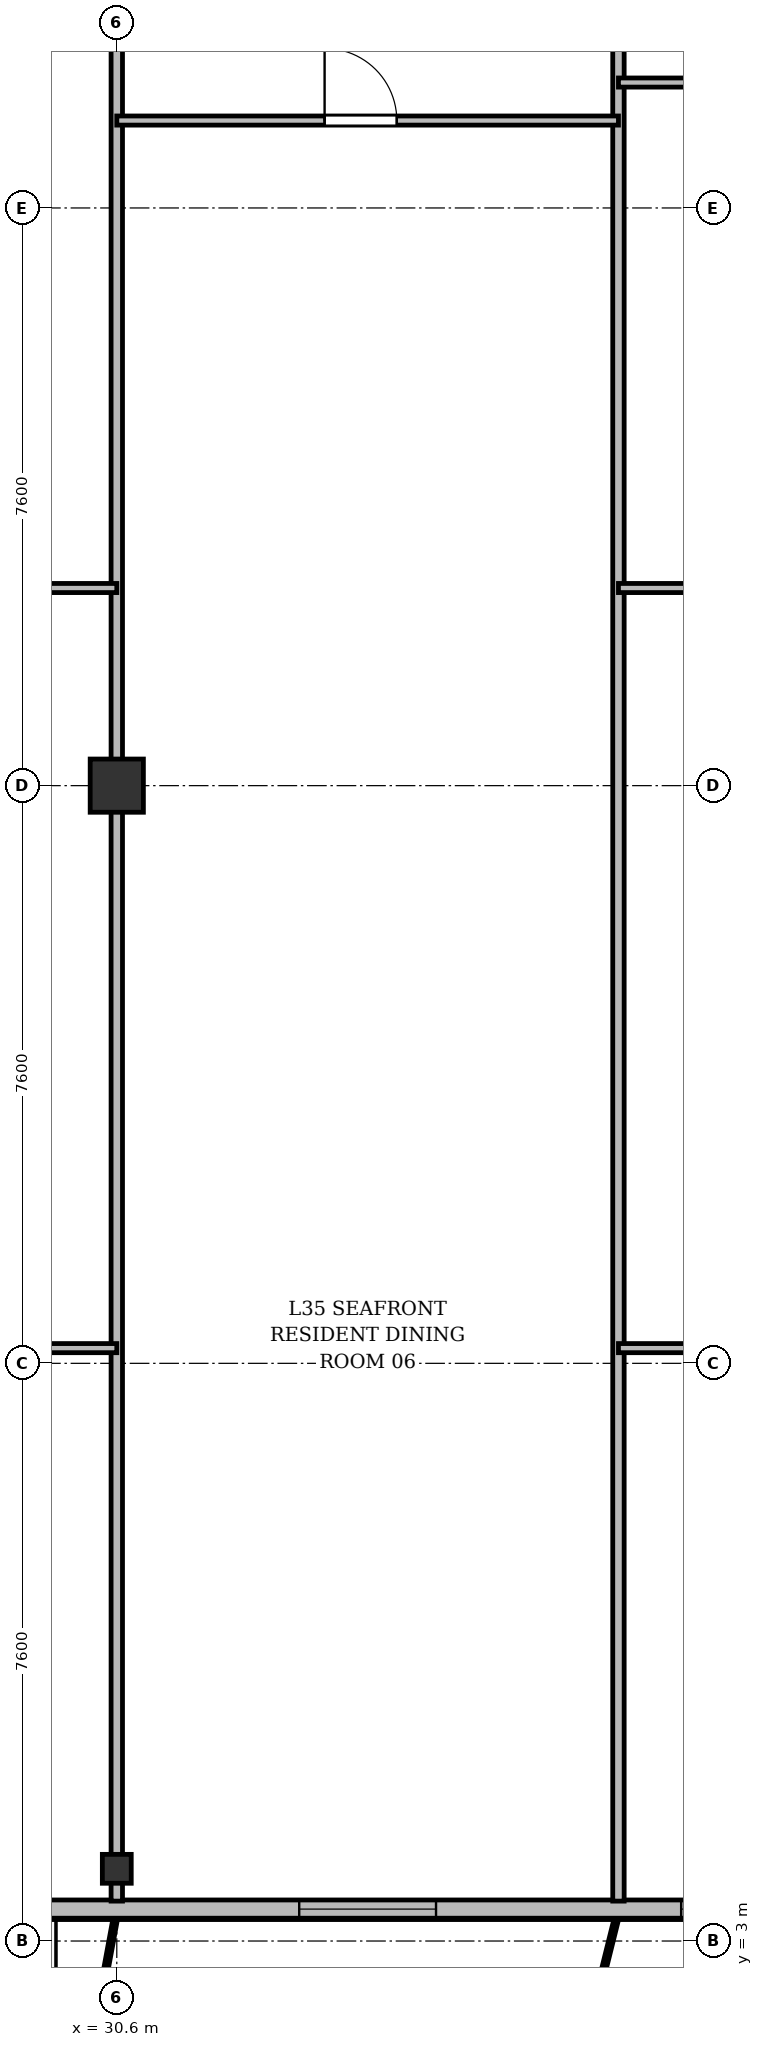
"""IFC4 building model, lengths in metres.
Left out: names, types, materials, properties, quantities, classifications, styles, units other than length and angle.
Written with IfcOpenShell. Run it as: python <this file> out.ifc"""

import sys

from ifc_helpers import new_model, si_unit, direction, frame, frame_2d, origin, origin_2d, place, context, subcontext, project, spatial, rectangle, i_section, extrude, source, transform, mapped, element, fill, save


model = new_model("IFC4")
c1 = context("Model", 3, precision=1e-05, world=origin(), true_north=direction((0.0, 1.0)))
c2 = subcontext(c1, "Body", "Model", "MODEL_VIEW")
j1 = project(units=[si_unit("LENGTHUNIT", "METRE"), si_unit("PLANEANGLEUNIT", "RADIAN")], contexts=[c1])
p1 = place(None, origin())
s1 = spatial("IfcSite", under=j1, at=p1, CompositionType="ELEMENT")
p2 = place(p1, origin())
s2 = spatial("IfcBuilding", under=s1, at=p2, CompositionType="ELEMENT")
p3 = place(p2, frame((0.0, 0.0, 135.7)))
s3 = spatial("IfcBuildingStorey", under=s2, at=p3, CompositionType="ELEMENT", Elevation=135.7)
m1 = source(origin(), c2, "Body", "SweptSolid", [
    extrude(i_section(OverallWidth=0.38, OverallDepth=0.38, WebThickness=0.02, FlangeThickness=0.03, at=origin_2d()), origin(), (0.0, 0.0, 1.0), 3.6),
])
p4 = place(p3, frame((30.6, 3.95, 0.0), z_axis=(0.0, 0.0, 1.0), x_axis=(1.0, 0.0, 0.0)))
e1 = element("IfcColumn", 1, at=p4, inside=s3, PredefinedType="COLUMN", context=c2, shape_type="MappedRepresentation", body=[
    mapped(m1, transform((0.0, 0.0, 0.0), x_axis=(1.0, 0.0, 0.0), y_axis=(0.0, 1.0, 0.0), z_axis=(0.0, 0.0, 1.0), scale=1.0)),
])
m2 = source(origin(), c2, "Body", "SweptSolid", [
    extrude(rectangle(XDim=0.7, YDim=0.7, at=origin_2d()), origin(), (0.0, 0.0, 1.0), 3.6),
])
p5 = place(p3, frame((30.6, 18.2, 0.0), z_axis=(0.0, 0.0, 1.0), x_axis=(1.0, 0.0, 0.0)))
e2 = element("IfcColumn", 2, at=p5, inside=s3, PredefinedType="COLUMN", context=c2, shape_type="MappedRepresentation", body=[
    mapped(m2, transform((0.0, 0.0, 0.0), x_axis=(1.0, 0.0, 0.0), y_axis=(0.0, 1.0, 0.0), z_axis=(0.0, 0.0, 1.0), scale=1.0)),
])
p6 = place(p3, frame((63.6, 3.42, 0.0), z_axis=(0.0, 0.0, 1.0), x_axis=(-1.0, 0.0, 0.0)))
e3 = element("IfcWall", 3, at=p6, inside=s3, PredefinedType="SOLIDWALL", context=c2, shape_type="SweptSolid", body=[
    extrude(rectangle(XDim=52.8, YDim=0.24, at=frame_2d((26.4, 0.0))), origin(), (0.0, 0.0, 1.0), 3.35),
])
p7 = place(p6, frame((0.345, 0.0, 0.9)))
e4 = element("IfcOpeningElement", 4, at=p7, cuts=e3, PredefinedType="OPENING", context=c2, shape_type="SweptSolid", body=[
    extrude(rectangle(XDim=1.8, YDim=1.8, at=frame_2d((0.9, 0.9))), frame((0.0, 0.13, 0.0), z_axis=(0.0, -1.0, 0.0), x_axis=(1.0, 0.0, 0.0)), (0.0, 0.0, 1.0), 0.26),
])
p8 = place(p6, frame((2.9, 0.0, 0.9)))
e5 = element("IfcOpeningElement", 5, at=p8, cuts=e3, PredefinedType="OPENING", context=c2, shape_type="SweptSolid", body=[
    extrude(rectangle(XDim=1.5, YDim=1.75, at=frame_2d((0.75, 0.875))), frame((0.0, 0.13, 0.0), z_axis=(0.0, -1.0, 0.0), x_axis=(1.0, 0.0, 0.0)), (0.0, 0.0, 1.0), 0.26),
])
p9 = place(p6, frame((5.902, 0.0, 0.0)))
e6 = element("IfcOpeningElement", 6, at=p9, cuts=e3, PredefinedType="OPENING", context=c2, shape_type="SweptSolid", body=[
    extrude(rectangle(XDim=1.2, YDim=2.2, at=frame_2d((0.6, 1.1))), frame((0.0, 0.13, 0.0), z_axis=(0.0, -1.0, 0.0), x_axis=(1.0, 0.0, 0.0)), (0.0, 0.0, 1.0), 0.26),
])
p10 = place(p6, frame((7.65, 0.0, 0.9)))
e7 = element("IfcOpeningElement", 7, at=p10, cuts=e3, PredefinedType="OPENING", context=c2, shape_type="SweptSolid", body=[
    extrude(rectangle(XDim=1.5, YDim=1.75, at=frame_2d((0.75, 0.875))), frame((0.0, 0.13, 0.0), z_axis=(0.0, -1.0, 0.0), x_axis=(1.0, 0.0, 0.0)), (0.0, 0.0, 1.0), 0.26),
])
p11 = place(p6, frame((10.175, 0.0, 0.9)))
e8 = element("IfcOpeningElement", 8, at=p11, cuts=e3, PredefinedType="OPENING", context=c2, shape_type="SweptSolid", body=[
    extrude(rectangle(XDim=1.65, YDim=1.85, at=frame_2d((0.825, 0.925))), frame((0.0, 0.13, 0.0), z_axis=(0.0, -1.0, 0.0), x_axis=(1.0, 0.0, 0.0)), (0.0, 0.0, 1.0), 0.26),
])
p12 = place(p6, frame((12.9, 0.0, 0.9)))
e9 = element("IfcOpeningElement", 9, at=p12, cuts=e3, PredefinedType="OPENING", context=c2, shape_type="SweptSolid", body=[
    extrude(rectangle(XDim=1.8, YDim=1.8, at=frame_2d((0.9, 0.9))), frame((0.0, 0.13, 0.0), z_axis=(0.0, -1.0, 0.0), x_axis=(1.0, 0.0, 0.0)), (0.0, 0.0, 1.0), 0.26),
])
p13 = place(p6, frame((15.45, 0.0, 0.9)))
e10 = element("IfcOpeningElement", 10, at=p13, cuts=e3, PredefinedType="OPENING", context=c2, shape_type="SweptSolid", body=[
    extrude(rectangle(XDim=1.5, YDim=1.75, at=frame_2d((0.75, 0.875))), frame((0.0, 0.13, 0.0), z_axis=(0.0, -1.0, 0.0), x_axis=(1.0, 0.0, 0.0)), (0.0, 0.0, 1.0), 0.26),
])
p14 = place(p6, frame((17.85, 0.0, 0.9)))
e11 = element("IfcOpeningElement", 11, at=p14, cuts=e3, PredefinedType="OPENING", context=c2, shape_type="SweptSolid", body=[
    extrude(rectangle(XDim=1.5, YDim=1.75, at=frame_2d((0.75, 0.875))), frame((0.0, 0.13, 0.0), z_axis=(0.0, -1.0, 0.0), x_axis=(1.0, 0.0, 0.0)), (0.0, 0.0, 1.0), 0.26),
])
p15 = place(p6, frame((20.45, 0.0, 0.9)))
e12 = element("IfcOpeningElement", 12, at=p15, cuts=e3, PredefinedType="OPENING", context=c2, shape_type="SweptSolid", body=[
    extrude(rectangle(XDim=2.0, YDim=1.95, at=frame_2d((1.0, 0.975))), frame((0.0, 0.13, 0.0), z_axis=(0.0, -1.0, 0.0), x_axis=(1.0, 0.0, 0.0)), (0.0, 0.0, 1.0), 0.26),
])
p16 = place(p6, frame((23.925, 0.0, 0.9)))
e13 = element("IfcOpeningElement", 13, at=p16, cuts=e3, PredefinedType="OPENING", context=c2, shape_type="SweptSolid", body=[
    extrude(rectangle(XDim=1.65, YDim=1.85, at=frame_2d((0.825, 0.925))), frame((0.0, 0.13, 0.0), z_axis=(0.0, -1.0, 0.0), x_axis=(1.0, 0.0, 0.0)), (0.0, 0.0, 1.0), 0.26),
])
p17 = place(p6, frame((28.8, 0.0, 0.9)))
e14 = element("IfcOpeningElement", 14, at=p17, cuts=e3, PredefinedType="OPENING", context=c2, shape_type="SweptSolid", body=[
    extrude(rectangle(XDim=1.8, YDim=1.8, at=frame_2d((0.9, 0.9))), frame((0.0, 0.13, 0.0), z_axis=(0.0, -1.0, 0.0), x_axis=(1.0, 0.0, 0.0)), (0.0, 0.0, 1.0), 0.26),
])
p18 = place(p6, frame((34.478, 0.0, 0.0)))
e15 = element("IfcOpeningElement", 15, at=p18, cuts=e3, PredefinedType="OPENING", context=c2, shape_type="SweptSolid", body=[
    extrude(rectangle(XDim=1.2, YDim=2.2, at=frame_2d((0.6, 1.1))), frame((0.0, 0.13, 0.0), z_axis=(0.0, -1.0, 0.0), x_axis=(1.0, 0.0, 0.0)), (0.0, 0.0, 1.0), 0.26),
])
p19 = place(p6, frame((37.65, 0.0, 0.9)))
e16 = element("IfcOpeningElement", 16, at=p19, cuts=e3, PredefinedType="OPENING", context=c2, shape_type="SweptSolid", body=[
    extrude(rectangle(XDim=1.5, YDim=1.75, at=frame_2d((0.75, 0.875))), frame((0.0, 0.13, 0.0), z_axis=(0.0, -1.0, 0.0), x_axis=(1.0, 0.0, 0.0)), (0.0, 0.0, 1.0), 0.26),
])
p20 = place(p6, frame((40.8, 0.0, 0.9)))
e17 = element("IfcOpeningElement", 17, at=p20, cuts=e3, PredefinedType="OPENING", context=c2, shape_type="SweptSolid", body=[
    extrude(rectangle(XDim=2.0, YDim=1.95, at=frame_2d((1.0, 0.975))), frame((0.0, 0.13, 0.0), z_axis=(0.0, -1.0, 0.0), x_axis=(1.0, 0.0, 0.0)), (0.0, 0.0, 1.0), 0.26),
])
p21 = place(p6, frame((43.65, 0.0, 0.9)))
e18 = element("IfcOpeningElement", 18, at=p21, cuts=e3, PredefinedType="OPENING", context=c2, shape_type="SweptSolid", body=[
    extrude(rectangle(XDim=1.5, YDim=1.75, at=frame_2d((0.75, 0.875))), frame((0.0, 0.13, 0.0), z_axis=(0.0, -1.0, 0.0), x_axis=(1.0, 0.0, 0.0)), (0.0, 0.0, 1.0), 0.26),
])
p22 = place(p6, frame((45.7, 0.0, 0.9)))
e19 = element("IfcOpeningElement", 19, at=p22, cuts=e3, PredefinedType="OPENING", context=c2, shape_type="SweptSolid", body=[
    extrude(rectangle(XDim=1.8, YDim=1.8, at=frame_2d((0.9, 0.9))), frame((0.0, 0.13, 0.0), z_axis=(0.0, -1.0, 0.0), x_axis=(1.0, 0.0, 0.0)), (0.0, 0.0, 1.0), 0.26),
])
p23 = place(p6, frame((48.25, 0.0, 0.9)))
e20 = element("IfcOpeningElement", 20, at=p23, cuts=e3, PredefinedType="OPENING", context=c2, shape_type="SweptSolid", body=[
    extrude(rectangle(XDim=1.5, YDim=1.75, at=frame_2d((0.75, 0.875))), frame((0.0, 0.13, 0.0), z_axis=(0.0, -1.0, 0.0), x_axis=(1.0, 0.0, 0.0)), (0.0, 0.0, 1.0), 0.26),
])
p24 = place(p6, frame((50.705, 0.0, 0.9)))
e21 = element("IfcOpeningElement", 21, at=p24, cuts=e3, PredefinedType="OPENING", context=c2, shape_type="SweptSolid", body=[
    extrude(rectangle(XDim=1.5, YDim=1.75, at=frame_2d((0.75, 0.875))), frame((0.0, 0.13, 0.0), z_axis=(0.0, -1.0, 0.0), x_axis=(1.0, 0.0, 0.0)), (0.0, 0.0, 1.0), 0.26),
])
p25 = place(p3, frame((30.6, 3.525, 0.0), z_axis=(0.0, 0.0, 1.0), x_axis=(0.0, 1.0, 0.0)))
e22 = element("IfcWall", 22, at=p25, inside=s3, PredefinedType="PARTITIONING", context=c2, shape_type="SweptSolid", body=[
    extrude(rectangle(XDim=27.275, YDim=0.15, at=frame_2d((13.638, 0.0))), origin(), (0.0, 0.0, 1.0), 2.85),
])
p26 = place(p3, frame((37.2, 3.525, 0.0), z_axis=(0.0, 0.0, 1.0), x_axis=(0.0, 1.0, 0.0)))
e23 = element("IfcWall", 23, at=p26, inside=s3, PredefinedType="PARTITIONING", context=c2, shape_type="SweptSolid", body=[
    extrude(rectangle(XDim=27.275, YDim=0.15, at=frame_2d((13.638, 0.0))), origin(), (0.0, 0.0, 1.0), 2.75),
])
p27 = place(p3, frame((23.4, 20.8, 0.0), z_axis=(0.0, 0.0, 1.0), x_axis=(1.0, 0.0, 0.0)))
e24 = element("IfcWall", 24, at=p27, inside=s3, PredefinedType="PARTITIONING", context=c2, shape_type="SweptSolid", body=[
    extrude(rectangle(XDim=7.2, YDim=0.12, at=frame_2d((3.6, 0.0))), origin(), (0.0, 0.0, 1.0), 2.85),
])
p28 = place(p27, frame((3.125, 0.0, 0.0)))
e25 = element("IfcOpeningElement", 25, at=p28, cuts=e24, PredefinedType="OPENING", context=c2, shape_type="SweptSolid", body=[
    extrude(rectangle(XDim=0.95, YDim=2.15, at=frame_2d((0.475, 1.075))), frame((0.0, 0.07, 0.0), z_axis=(0.0, -1.0, 0.0), x_axis=(1.0, 0.0, 0.0)), (0.0, 0.0, 1.0), 0.14),
])
p29 = place(p3, frame((27.0, 10.8, 0.0), z_axis=(0.0, 0.0, 1.0), x_axis=(1.0, 0.0, 0.0)))
e26 = element("IfcWall", 26, at=p29, inside=s3, PredefinedType="PARTITIONING", context=c2, shape_type="SweptSolid", body=[
    extrude(rectangle(XDim=3.6, YDim=0.12, at=frame_2d((1.8, 0.0))), origin(), (0.0, 0.0, 1.0), 2.85),
])
p30 = place(p29, frame((1.325, 0.0, 0.0)))
e27 = element("IfcOpeningElement", 27, at=p30, cuts=e26, PredefinedType="OPENING", context=c2, shape_type="SweptSolid", body=[
    extrude(rectangle(XDim=0.95, YDim=2.15, at=frame_2d((0.475, 1.075))), frame((0.0, 0.07, 0.0), z_axis=(0.0, -1.0, 0.0), x_axis=(1.0, 0.0, 0.0)), (0.0, 0.0, 1.0), 0.14),
])
p31 = place(p3, frame((30.6, 26.95, 0.0), z_axis=(0.0, 0.0, 1.0), x_axis=(1.0, 0.0, 0.0)))
e28 = element("IfcWall", 28, at=p31, inside=s3, PredefinedType="PARTITIONING", context=c2, shape_type="SweptSolid", body=[
    extrude(rectangle(XDim=6.6, YDim=0.12, at=frame_2d((3.3, 0.0))), origin(), (0.0, 0.0, 1.0), 2.85),
])
p32 = place(p31, frame((2.734, 0.0, 0.0)))
e29 = element("IfcOpeningElement", 29, at=p32, cuts=e28, PredefinedType="OPENING", context=c2, shape_type="SweptSolid", body=[
    extrude(rectangle(XDim=0.95, YDim=2.15, at=frame_2d((0.475, 1.075))), frame((0.0, 0.07, 0.0), z_axis=(0.0, -1.0, 0.0), x_axis=(1.0, 0.0, 0.0)), (0.0, 0.0, 1.0), 0.14),
])
p33 = place(p3, frame((37.2, 20.8, 0.0), z_axis=(0.0, 0.0, 1.0), x_axis=(1.0, 0.0, 0.0)))
e30 = element("IfcWall", 30, at=p33, inside=s3, PredefinedType="PARTITIONING", context=c2, shape_type="SweptSolid", body=[
    extrude(rectangle(XDim=6.6, YDim=0.12, at=frame_2d((3.3, 0.0))), origin(), (0.0, 0.0, 1.0), 2.85),
])
p34 = place(p33, frame((2.734, 0.0, 0.0)))
e31 = element("IfcOpeningElement", 31, at=p34, cuts=e30, PredefinedType="OPENING", context=c2, shape_type="SweptSolid", body=[
    extrude(rectangle(XDim=0.95, YDim=2.15, at=frame_2d((0.475, 1.075))), frame((0.0, 0.07, 0.0), z_axis=(0.0, -1.0, 0.0), x_axis=(1.0, 0.0, 0.0)), (0.0, 0.0, 1.0), 0.14),
])
p35 = place(p3, frame((37.2, 27.45, 0.0), z_axis=(0.0, 0.0, 1.0), x_axis=(1.0, 0.0, 0.0)))
e32 = element("IfcWall", 32, at=p35, inside=s3, PredefinedType="PARTITIONING", context=c2, shape_type="SweptSolid", body=[
    extrude(rectangle(XDim=2.294, YDim=0.12, at=frame_2d((1.147, 0.0))), origin(), (0.0, 0.0, 1.0), 3.35),
])
p36 = place(p3, frame((37.2, 10.8, 0.0), z_axis=(0.0, 0.0, 1.0), x_axis=(1.0, 0.0, 0.0)))
e33 = element("IfcWall", 33, at=p36, inside=s3, PredefinedType="PARTITIONING", context=c2, shape_type="SweptSolid", body=[
    extrude(rectangle(XDim=3.3, YDim=0.12, at=frame_2d((1.65, 0.0))), origin(), (0.0, 0.0, 1.0), 3.0),
])
p37 = place(p36, frame((1.175, 0.0, 0.0)))
e34 = element("IfcOpeningElement", 34, at=p37, cuts=e33, PredefinedType="OPENING", context=c2, shape_type="SweptSolid", body=[
    extrude(rectangle(XDim=0.95, YDim=2.15, at=frame_2d((0.475, 1.075))), frame((0.0, 0.07, 0.0), z_axis=(0.0, -1.0, 0.0), x_axis=(1.0, 0.0, 0.0)), (0.0, 0.0, 1.0), 0.14),
])
m3 = source(origin(), c2, "Body", "SweptSolid", [
    extrude(rectangle(XDim=1.65, YDim=1.85, at=frame_2d((0.825, 0.925))), frame((0.0, 0.03, 0.0), z_axis=(0.0, -1.0, 0.0), x_axis=(1.0, 0.0, 0.0)), (0.0, 0.0, 1.0), 0.06),
])
p38 = place(p16, origin())
e35 = element("IfcWindow", 35, at=p38, inside=s3, PartitioningType="SINGLE_PANEL", PredefinedType="WINDOW", context=c2, shape_type="MappedRepresentation", body=[
    mapped(m3, transform((0.0, 0.0, 0.0), x_axis=(1.0, 0.0, 0.0), y_axis=(0.0, 1.0, 0.0), z_axis=(0.0, 0.0, 1.0), scale=1.0)),
])
fill(e13, e35)
m4 = source(origin(), c2, "Body", "SweptSolid", [
    extrude(rectangle(XDim=1.8, YDim=1.8, at=frame_2d((0.9, 0.9))), frame((0.0, 0.03, 0.0), z_axis=(0.0, -1.0, 0.0), x_axis=(1.0, 0.0, 0.0)), (0.0, 0.0, 1.0), 0.06),
])
p39 = place(p17, origin())
e36 = element("IfcWindow", 36, at=p39, inside=s3, PartitioningType="SINGLE_PANEL", PredefinedType="WINDOW", context=c2, shape_type="MappedRepresentation", body=[
    mapped(m4, transform((0.0, 0.0, 0.0), x_axis=(1.0, 0.0, 0.0), y_axis=(0.0, 1.0, 0.0), z_axis=(0.0, 0.0, 1.0), scale=1.0)),
])
fill(e14, e36)
m5 = source(origin(), c2, "Body", "SweptSolid", [
    extrude(rectangle(XDim=0.95, YDim=2.15, at=frame_2d((0.475, 1.075))), frame((0.0, 0.025, 0.0), z_axis=(0.0, -1.0, 0.0), x_axis=(1.0, 0.0, 0.0)), (0.0, 0.0, 1.0), 0.05),
])
p40 = place(p32, origin())
e37 = element("IfcDoor", 37, at=p40, inside=s3, OperationType="SINGLE_SWING_LEFT", PredefinedType="DOOR", context=c2, shape_type="MappedRepresentation", body=[
    mapped(m5, transform((0.0, 0.0, 0.0), x_axis=(1.0, 0.0, 0.0), y_axis=(0.0, 1.0, 0.0), z_axis=(0.0, 0.0, 1.0), scale=1.0)),
])
fill(e29, e37)
save(model, sys.argv[1])
